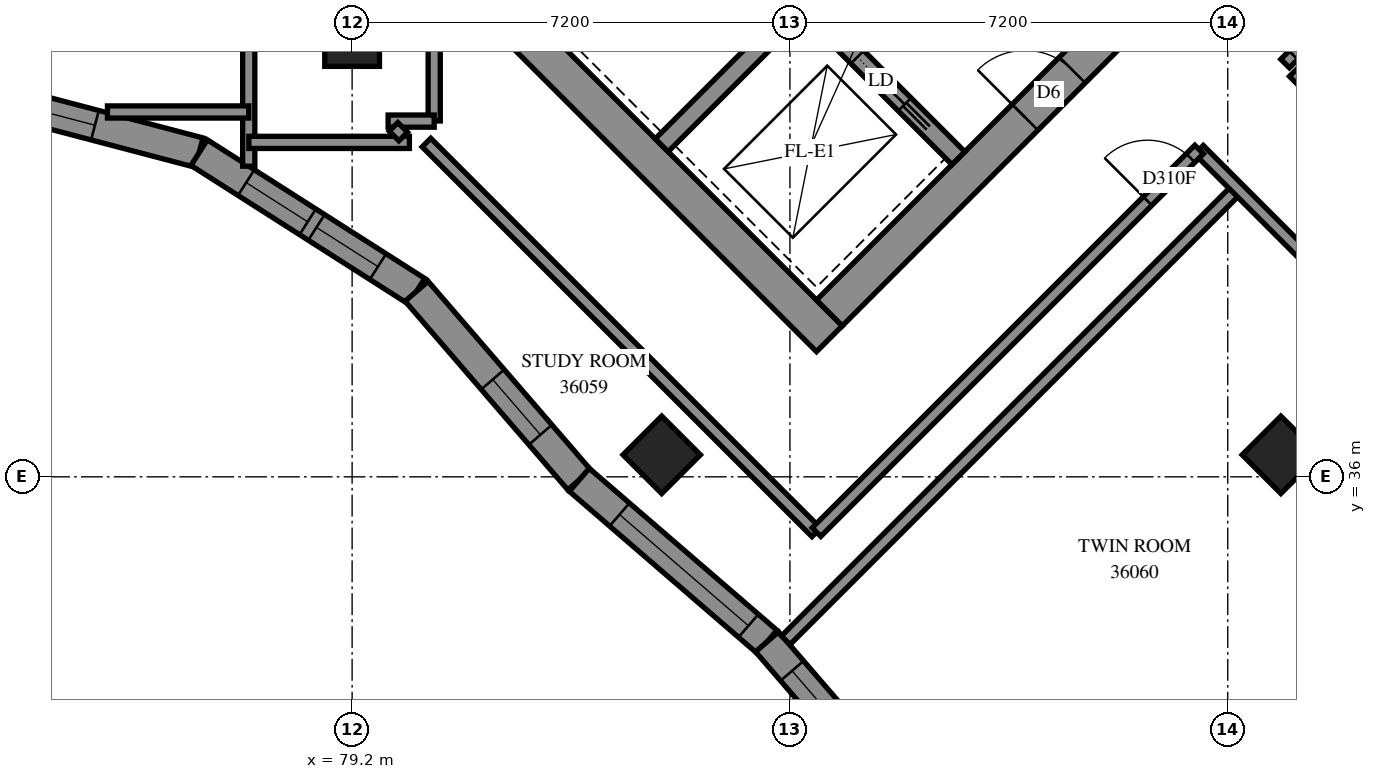
"""IFC4 building model, lengths in metres.
Left out: names, types, materials, properties, quantities, classifications, styles, units other than length and angle.
Written with IfcOpenShell. Run it as: python <this file> out.ifc"""

import sys

from ifc_helpers import new_model, si_unit, direction, frame, frame_2d, origin, origin_2d, place, context, subcontext, project, spatial, polyline, rectangle, outline, extrude, element, fill, save


model = new_model("IFC4")
c1 = context("Model", 3, precision=1e-05, world=origin(), true_north=direction((0.0, 1.0)))
c2 = subcontext(c1, "Body", "Model", "MODEL_VIEW")
j1 = project(units=[si_unit("LENGTHUNIT", "METRE"), si_unit("PLANEANGLEUNIT", "RADIAN")], contexts=[c1])
p1 = place(None, origin())
s1 = spatial("IfcSite", under=j1, at=p1, CompositionType="ELEMENT")
p2 = place(p1, origin())
s2 = spatial("IfcBuilding", under=s1, at=p2, CompositionType="ELEMENT")
p3 = place(p2, frame((0.0, 0.0, 135.4)))
s3 = spatial("IfcBuildingStorey", under=s2, at=p3, CompositionType="ELEMENT", Elevation=135.4)
for number, where, z_axis, x_axis in (
    (1, (79.2, 43.2, 0.0), (0.0, 0.0, 1.0), (1.0, 0.0, 0.0)),
    (2, (84.291, 36.362, 0.0), (0.0, 0.0, 1.0), (0.707, -0.707, 0.0)),
    (3, (94.474, 36.362, 0.0), (0.0, 0.0, 1.0), (0.707, -0.707, 0.0)),
):
    element("IfcColumn", number, at=place(p3, frame(where, z_axis=z_axis, x_axis=x_axis)), inside=s3, PredefinedType="COLUMN", context=c2, shape_type="SweptSolid", body=[
        extrude(rectangle(XDim=0.9, YDim=0.9, at=origin_2d()), origin(), (0.0, 0.0, 1.0), 3.1),
    ])
p4 = place(p3, frame((76.018, 49.302, -0.3), z_axis=(0.0, 0.0, 1.0), x_axis=(0.7071067812, -0.7071067812, 0.0)))
e4 = element("IfcWall", 4, at=p4, inside=s3, PredefinedType="SHEAR", context=c2, shape_type="SweptSolid", body=[
    extrude(rectangle(XDim=15.6, YDim=0.6, at=frame_2d((7.8, 0.0))), origin(), (0.0, 0.0, 1.0), 2.7),
])
p5 = place(p3, frame((87.049, 38.695, -0.3), z_axis=(0.0, 0.0, 1.0), x_axis=(0.7071067812, 0.7071067812, 0.0)))
e5 = element("IfcWall", 5, at=p5, inside=s3, PredefinedType="SHEAR", context=c2, shape_type="SweptSolid", body=[
    extrude(rectangle(XDim=14.4, YDim=0.6, at=frame_2d((7.2, 0.0))), origin(), (0.0, 0.0, 1.0), 2.7),
])
p6 = place(p5, frame((4.55, 0.0, 0.3)))
e6 = element("IfcOpeningElement", 6, at=p6, cuts=e5, PredefinedType="OPENING", context=c2, shape_type="SweptSolid", body=[
    extrude(rectangle(XDim=1.1, YDim=2.1, at=frame_2d((0.55, 1.05))), frame((0.0, 0.31, 0.0), z_axis=(0.0, -1.0, 0.0), x_axis=(1.0, 0.0, 0.0)), (0.0, 0.0, 1.0), 0.62),
])
p7 = place(p5, frame((11.35, 0.0, 0.3)))
e7 = element("IfcOpeningElement", 7, at=p7, cuts=e5, PredefinedType="OPENING", context=c2, shape_type="SweptSolid", body=[
    extrude(rectangle(XDim=1.1, YDim=2.1, at=frame_2d((0.55, 1.05))), frame((0.0, 0.31, 0.0), z_axis=(0.0, -1.0, 0.0), x_axis=(1.0, 0.0, 0.0)), (0.0, 0.0, 1.0), 0.62),
])
p8 = place(p3, frame((84.291, 41.453, 0.0), z_axis=(0.0, 0.0, 1.0), x_axis=(0.7071067812, 0.7071067812, 0.0)))
e8 = element("IfcWall", 8, at=p8, inside=s3, PredefinedType="SOLIDWALL", context=c2, shape_type="SweptSolid", body=[
    extrude(rectangle(XDim=3.3, YDim=0.3, at=frame_2d((1.65, 0.0))), origin(), (0.0, 0.0, 1.0), 3.1),
])
p9 = place(p3, frame((78.988, 51.423, 0.0), z_axis=(0.0, 0.0, 1.0), x_axis=(0.7071067812, -0.7071067812, 0.0)))
e9 = element("IfcWall", 9, at=p9, inside=s3, PredefinedType="SOLIDWALL", context=c2, shape_type="SweptSolid", body=[
    extrude(rectangle(XDim=14.4, YDim=0.3, at=frame_2d((7.2, 0.0))), origin(), (0.0, 0.0, 1.0), 3.1),
])
p10 = place(p9, frame((12.05, 0.0, 0.0)))
e10 = element("IfcOpeningElement", 10, at=p10, cuts=e9, PredefinedType="OPENING", context=c2, shape_type="SweptSolid", body=[
    extrude(rectangle(XDim=1.1, YDim=2.1, at=frame_2d((0.55, 1.05))), frame((0.0, 0.16, 0.0), z_axis=(0.0, -1.0, 0.0), x_axis=(1.0, 0.0, 0.0)), (0.0, 0.0, 1.0), 0.32),
])
p11 = place(p3, frame((73.182, 42.253, 0.0), z_axis=(0.0, 0.0, 1.0), x_axis=(0.9671281624, -0.2542894363, 0.0)))
e11 = element("IfcWall", 11, at=p11, inside=s3, PredefinedType="SOLIDWALL", context=c2, shape_type="SweptSolid", body=[
    extrude(outline(polyline([(0.043, -0.25), (3.583, -0.25), (3.661, 0.25), (-0.043, 0.25), (0.043, -0.25)])), origin(), (0.0, 0.0, 1.0), 3.1),
])
p12 = place(p11, frame((0.65, 0.0, 0.45)))
e12 = element("IfcOpeningElement", 12, at=p12, cuts=e11, PredefinedType="OPENING", context=c2, shape_type="SweptSolid", body=[
    extrude(rectangle(XDim=1.2, YDim=2.5, at=frame_2d((0.6, 1.25))), frame((0.0, 0.26, 0.0), z_axis=(0.0, -1.0, 0.0), x_axis=(1.0, 0.0, 0.0)), (0.0, 0.0, 1.0), 0.52),
])
p13 = place(p3, frame((76.684, 41.332, 0.0), z_axis=(0.0, 0.0, 1.0), x_axis=(0.8431951323, -0.5376076347, 0.0)))
e13 = element("IfcWall", 13, at=p13, inside=s3, PredefinedType="SOLIDWALL", context=c2, shape_type="SweptSolid", body=[
    extrude(outline(polyline([(0.039, -0.25), (4.204, -0.25), (4.278, 0.25), (-0.039, 0.25), (0.039, -0.25)])), origin(), (0.0, 0.0, 1.0), 3.1),
])
p14 = place(p13, frame((0.917, 0.0, 0.45)))
e14 = element("IfcOpeningElement", 14, at=p14, cuts=e13, PredefinedType="OPENING", context=c2, shape_type="SweptSolid", body=[
    extrude(rectangle(XDim=1.2, YDim=2.5, at=frame_2d((0.6, 1.25))), frame((0.0, 0.26, 0.0), z_axis=(0.0, -1.0, 0.0), x_axis=(1.0, 0.0, 0.0)), (0.0, 0.0, 1.0), 0.52),
])
p15 = place(p13, frame((2.288, 0.0, 0.45)))
e15 = element("IfcOpeningElement", 15, at=p15, cuts=e13, PredefinedType="OPENING", context=c2, shape_type="SweptSolid", body=[
    extrude(rectangle(XDim=1.2, YDim=2.5, at=frame_2d((0.6, 1.25))), frame((0.0, 0.26, 0.0), z_axis=(0.0, -1.0, 0.0), x_axis=(1.0, 0.0, 0.0)), (0.0, 0.0, 1.0), 0.52),
])
p16 = place(p3, frame((80.26, 39.052, 0.0), z_axis=(0.0, 0.0, 1.0), x_axis=(0.6531786437, -0.7572038427, 0.0)))
e16 = element("IfcWall", 16, at=p16, inside=s3, PredefinedType="SOLIDWALL", context=c2, shape_type="SweptSolid", body=[
    extrude(outline(polyline([(0.037, -0.25), (4.114, -0.25), (4.078, 0.25), (-0.037, 0.25), (0.037, -0.25)])), origin(), (0.0, 0.0, 1.0), 3.1),
])
p17 = place(p16, frame((1.917, 0.0, 0.45)))
e17 = element("IfcOpeningElement", 17, at=p17, cuts=e16, PredefinedType="OPENING", context=c2, shape_type="SweptSolid", body=[
    extrude(rectangle(XDim=1.2, YDim=2.5, at=frame_2d((0.6, 1.25))), frame((0.0, 0.26, 0.0), z_axis=(0.0, -1.0, 0.0), x_axis=(1.0, 0.0, 0.0)), (0.0, 0.0, 1.0), 0.52),
])
p18 = place(p3, frame((82.936, 35.95, 0.0), z_axis=(0.0, 0.0, 1.0), x_axis=(0.7572154684, -0.6531651662, 0.0)))
e18 = element("IfcWall", 18, at=p18, inside=s3, PredefinedType="SOLIDWALL", context=c2, shape_type="SweptSolid", body=[
    extrude(outline(polyline([(-0.018, -0.25), (4.059, -0.25), (4.096, 0.25), (0.018, 0.25), (-0.018, -0.25)])), origin(), (0.0, 0.0, 1.0), 3.1),
])
p19 = place(p18, frame((0.873, 0.0, 0.45)))
e19 = element("IfcOpeningElement", 19, at=p19, cuts=e18, PredefinedType="OPENING", context=c2, shape_type="SweptSolid", body=[
    extrude(rectangle(XDim=2.8, YDim=2.5, at=frame_2d((1.4, 1.25))), frame((0.0, 0.26, 0.0), z_axis=(0.0, -1.0, 0.0), x_axis=(1.0, 0.0, 0.0)), (0.0, 0.0, 1.0), 0.52),
])
p20 = place(p3, frame((86.024, 33.287, 0.0), z_axis=(0.0, 0.0, 1.0), x_axis=(0.6531651662, -0.7572154684, 0.0)))
e20 = element("IfcWall", 20, at=p20, inside=s3, PredefinedType="SOLIDWALL", context=c2, shape_type="SweptSolid", body=[
    extrude(outline(polyline([(0.018, -0.25), (4.096, -0.25), (4.059, 0.25), (-0.018, 0.25), (0.018, -0.25)])), origin(), (0.0, 0.0, 1.0), 3.1),
])
p21 = place(p20, frame((0.63, 0.0, 0.45)))
e21 = element("IfcOpeningElement", 21, at=p21, cuts=e20, PredefinedType="OPENING", context=c2, shape_type="SweptSolid", body=[
    extrude(rectangle(XDim=2.8, YDim=2.5, at=frame_2d((1.4, 1.25))), frame((0.0, 0.26, 0.0), z_axis=(0.0, -1.0, 0.0), x_axis=(1.0, 0.0, 0.0)), (0.0, 0.0, 1.0), 0.52),
])
p22 = place(p3, frame((86.332, 33.313, 0.0), z_axis=(0.0, 0.0, 1.0), x_axis=(0.7071020252, 0.7071115371, 0.0)))
e22 = element("IfcWall", 22, at=p22, inside=s3, PredefinedType="PARTITIONING", context=c2, shape_type="SweptSolid", body=[
    extrude(rectangle(XDim=10.513, YDim=0.2, at=frame_2d((5.257, 0.0))), origin(), (0.0, 0.0, 1.0), 3.1),
])
p23 = place(p3, frame((93.127, 41.379, 0.0), z_axis=(0.0, 0.0, 1.0), x_axis=(0.7071067812, -0.7071067812, 0.0)))
e23 = element("IfcWall", 23, at=p23, inside=s3, PredefinedType="PARTITIONING", context=c2, shape_type="SweptSolid", body=[
    extrude(rectangle(XDim=9.39, YDim=0.2, at=frame_2d((4.695, 0.0))), origin(), (0.0, 0.0, 1.0), 3.1),
])
p24 = place(p23, frame((3.2, 0.0, 0.0)))
e24 = element("IfcOpeningElement", 24, at=p24, cuts=e23, PredefinedType="OPENING", context=c2, shape_type="SweptSolid", body=[
    extrude(rectangle(XDim=0.9, YDim=2.1, at=frame_2d((0.45, 1.05))), frame((0.0, 0.11, 0.0), z_axis=(0.0, -1.0, 0.0), x_axis=(1.0, 0.0, 0.0)), (0.0, 0.0, 1.0), 0.22),
])
p25 = place(p3, frame((80.423, 41.497, 0.0), z_axis=(0.0, 0.0, 1.0), x_axis=(0.7071067812, -0.7071067812, 0.0)))
e25 = element("IfcWall", 25, at=p25, inside=s3, PredefinedType="PARTITIONING", context=c2, shape_type="SweptSolid", body=[
    extrude(rectangle(XDim=9.065, YDim=0.2, at=frame_2d((4.532, 0.0))), origin(), (0.0, 0.0, 1.0), 3.1),
])
p26 = place(p3, frame((94.543, 42.797, 0.0), z_axis=(0.0, 0.0, 1.0), x_axis=(0.7071067812, 0.7071067812, 0.0)))
e26 = element("IfcWall", 26, at=p26, inside=s3, PredefinedType="PARTITIONING", context=c2, shape_type="SweptSolid", body=[
    extrude(rectangle(XDim=8.901, YDim=0.2, at=frame_2d((4.45, 0.0))), origin(), (0.0, 0.0, 1.0), 3.1),
])
p27 = place(p26, frame((0.193, 0.0, 0.0)))
e27 = element("IfcOpeningElement", 27, at=p27, cuts=e26, PredefinedType="OPENING", context=c2, shape_type="SweptSolid", body=[
    extrude(rectangle(XDim=1.0, YDim=2.1, at=frame_2d((0.5, 1.05))), frame((0.0, 0.11, 0.0), z_axis=(0.0, -1.0, 0.0), x_axis=(1.0, 0.0, 0.0)), (0.0, 0.0, 1.0), 0.22),
])
p28 = place(p3, frame((86.837, 35.091, 0.0), z_axis=(0.0, 0.0, 1.0), x_axis=(0.7071067812, 0.7071067812, 0.0)))
e28 = element("IfcWall", 28, at=p28, inside=s3, PredefinedType="PARTITIONING", context=c2, shape_type="SweptSolid", body=[
    extrude(rectangle(XDim=8.898, YDim=0.2, at=frame_2d((4.449, 0.0))), origin(), (0.0, 0.0, 1.0), 3.1),
])
p29 = place(p28, frame((7.7, 0.0, 0.0)))
e29 = element("IfcOpeningElement", 29, at=p29, cuts=e28, PredefinedType="OPENING", context=c2, shape_type="SweptSolid", body=[
    extrude(rectangle(XDim=1.0, YDim=2.1, at=frame_2d((0.5, 1.05))), frame((0.0, 0.11, 0.0), z_axis=(0.0, -1.0, 0.0), x_axis=(1.0, 0.0, 0.0)), (0.0, 0.0, 1.0), 0.22),
])
p30 = place(p3, frame((91.398, 28.19, 0.0), z_axis=(0.0, 0.0, 1.0), x_axis=(0.7072294342, 0.7069841069, 0.0)))
e30 = element("IfcWall", 30, at=p30, inside=s3, PredefinedType="PARTITIONING", context=c2, shape_type="SweptSolid", body=[
    extrude(rectangle(XDim=8.152, YDim=0.2, at=frame_2d((4.076, 0.0))), origin(), (0.0, 0.0, 1.0), 3.1),
])
p31 = place(p3, frame((77.5, 41.108, 0.0), z_axis=(0.0, 0.0, 1.0), x_axis=(0.0, 1.0, 0.0)))
e31 = element("IfcWall", 31, at=p31, inside=s3, PredefinedType="PARTITIONING", context=c2, shape_type="SweptSolid", body=[
    extrude(rectangle(XDim=3.034, YDim=0.2, at=frame_2d((1.517, 0.0))), origin(), (0.0, 0.0, 1.0), 3.1),
])
p32 = place(p3, frame((77.502, 41.5, 0.0), z_axis=(0.0, 0.0, 1.0), x_axis=(1.0, 0.0, 0.0)))
e32 = element("IfcWall", 32, at=p32, inside=s3, PredefinedType="PARTITIONING", context=c2, shape_type="SweptSolid", body=[
    extrude(rectangle(XDim=2.64, YDim=0.2, at=frame_2d((1.32, 0.0))), origin(), (0.0, 0.0, 1.0), 3.1),
])
p33 = place(p3, frame((80.55, 41.852, 0.0), z_axis=(0.0, 0.0, 1.0), x_axis=(0.0, 1.0, 0.0)))
e33 = element("IfcWall", 33, at=p33, inside=s3, PredefinedType="PARTITIONING", context=c2, shape_type="SweptSolid", body=[
    extrude(rectangle(XDim=2.38, YDim=0.2, at=frame_2d((1.19, 0.0))), origin(), (0.0, 0.0, 1.0), 3.1),
])
p34 = place(p3, frame((75.177, 42.0, 0.0), z_axis=(0.0, 0.0, 1.0), x_axis=(1.0, 0.0, 0.0)))
e34 = element("IfcWall", 34, at=p34, inside=s3, PredefinedType="PARTITIONING", context=c2, shape_type="SweptSolid", body=[
    extrude(rectangle(XDim=2.324, YDim=0.2, at=frame_2d((1.162, 0.0))), origin(), (0.0, 0.0, 1.0), 3.1),
])
p35 = place(p3, frame((79.792, 41.85, 0.0), z_axis=(0.0, 0.0, 1.0), x_axis=(1.0, 0.0, 0.0)))
e35 = element("IfcWall", 35, at=p35, inside=s3, PredefinedType="PARTITIONING", context=c2, shape_type="SweptSolid", body=[
    extrude(rectangle(XDim=0.758, YDim=0.2, at=frame_2d((0.379, 0.0))), origin(), (0.0, 0.0, 1.0), 3.1),
])
p36 = place(p3, frame((94.686, 42.656, 0.0), z_axis=(0.0, 0.0, 1.0), x_axis=(0.7056768426, -0.7085338339, 0.0)))
e36 = element("IfcWall", 36, at=p36, inside=s3, PredefinedType="PARTITIONING", context=c2, shape_type="SweptSolid", body=[
    extrude(rectangle(XDim=0.7, YDim=0.2, at=frame_2d((0.35, 0.0))), origin(), (0.0, 0.0, 1.0), 3.1),
])
p37 = place(p3, frame((79.881, 41.755, 0.0), z_axis=(0.0, 0.0, 1.0), x_axis=(0.7071067812, -0.7071067812, 0.0)))
e37 = element("IfcWall", 37, at=p37, inside=s3, PredefinedType="PARTITIONING", context=c2, shape_type="SweptSolid", body=[
    extrude(rectangle(XDim=0.225, YDim=0.2, at=frame_2d((0.113, 0.0))), origin(), (0.0, 0.0, 1.0), 3.1),
])
p38 = place(p12, origin())
e38 = element("IfcWindow", 38, at=p38, inside=s3, PartitioningType="SINGLE_PANEL", PredefinedType="WINDOW", context=c2, shape_type="SweptSolid", body=[
    extrude(rectangle(XDim=1.2, YDim=2.5, at=frame_2d((0.6, 1.25))), frame((0.0, 0.18, 0.0), z_axis=(0.0, -1.0, 0.0), x_axis=(1.0, 0.0, 0.0)), (0.0, 0.0, 1.0), 0.06),
])
fill(e12, e38)
p39 = place(p14, origin())
e39 = element("IfcWindow", 39, at=p39, inside=s3, PartitioningType="SINGLE_PANEL", PredefinedType="WINDOW", context=c2, shape_type="SweptSolid", body=[
    extrude(rectangle(XDim=1.2, YDim=2.5, at=frame_2d((0.6, 1.25))), frame((0.0, 0.18, 0.0), z_axis=(0.0, -1.0, 0.0), x_axis=(1.0, 0.0, 0.0)), (0.0, 0.0, 1.0), 0.06),
])
fill(e14, e39)
p40 = place(p15, origin())
e40 = element("IfcWindow", 40, at=p40, inside=s3, PartitioningType="SINGLE_PANEL", PredefinedType="WINDOW", context=c2, shape_type="SweptSolid", body=[
    extrude(rectangle(XDim=1.2, YDim=2.5, at=frame_2d((0.6, 1.25))), frame((0.0, 0.18, 0.0), z_axis=(0.0, -1.0, 0.0), x_axis=(1.0, 0.0, 0.0)), (0.0, 0.0, 1.0), 0.06),
])
fill(e15, e40)
p41 = place(p17, origin())
e41 = element("IfcWindow", 41, at=p41, inside=s3, PartitioningType="SINGLE_PANEL", PredefinedType="WINDOW", context=c2, shape_type="SweptSolid", body=[
    extrude(rectangle(XDim=1.2, YDim=2.5, at=frame_2d((0.6, 1.25))), frame((0.0, 0.18, 0.0), z_axis=(0.0, -1.0, 0.0), x_axis=(1.0, 0.0, 0.0)), (0.0, 0.0, 1.0), 0.06),
])
fill(e17, e41)
p42 = place(p19, origin())
e42 = element("IfcWindow", 42, at=p42, inside=s3, PartitioningType="SINGLE_PANEL", PredefinedType="WINDOW", context=c2, shape_type="SweptSolid", body=[
    extrude(rectangle(XDim=2.8, YDim=2.5, at=frame_2d((1.4, 1.25))), frame((0.0, 0.18, 0.0), z_axis=(0.0, -1.0, 0.0), x_axis=(1.0, 0.0, 0.0)), (0.0, 0.0, 1.0), 0.06),
])
fill(e19, e42)
p43 = place(p21, origin())
e43 = element("IfcWindow", 43, at=p43, inside=s3, PartitioningType="SINGLE_PANEL", PredefinedType="WINDOW", context=c2, shape_type="SweptSolid", body=[
    extrude(rectangle(XDim=2.8, YDim=2.5, at=frame_2d((1.4, 1.25))), frame((0.0, 0.18, 0.0), z_axis=(0.0, -1.0, 0.0), x_axis=(1.0, 0.0, 0.0)), (0.0, 0.0, 1.0), 0.06),
])
fill(e21, e43)
p44 = place(p6, origin())
e44 = element("IfcDoor", 44, at=p44, inside=s3, OperationType="DOUBLE_DOOR_SINGLE_SWING", PredefinedType="DOOR", context=c2, shape_type="SweptSolid", body=[
    extrude(rectangle(XDim=1.1, YDim=2.1, at=frame_2d((0.55, 1.05))), frame((0.0, 0.025, 0.0), z_axis=(0.0, -1.0, 0.0), x_axis=(1.0, 0.0, 0.0)), (0.0, 0.0, 1.0), 0.05),
])
fill(e6, e44)
p45 = place(p10, origin())
e45 = element("IfcDoor", 45, at=p45, inside=s3, OperationType="SLIDING_TO_RIGHT", PredefinedType="DOOR", context=c2, shape_type="SweptSolid", body=[
    extrude(rectangle(XDim=1.1, YDim=2.1, at=frame_2d((0.55, 1.05))), frame((0.0, 0.025, 0.0), z_axis=(0.0, -1.0, 0.0), x_axis=(1.0, 0.0, 0.0)), (0.0, 0.0, 1.0), 0.05),
])
fill(e10, e45)
p46 = place(p27, origin())
e46 = element("IfcDoor", 46, at=p46, inside=s3, OperationType="SINGLE_SWING_LEFT", PredefinedType="DOOR", context=c2, shape_type="SweptSolid", body=[
    extrude(rectangle(XDim=1.0, YDim=2.1, at=frame_2d((0.5, 1.05))), frame((0.0, 0.025, 0.0), z_axis=(0.0, -1.0, 0.0), x_axis=(1.0, 0.0, 0.0)), (0.0, 0.0, 1.0), 0.05),
])
fill(e27, e46)
p47 = place(p29, origin())
e47 = element("IfcDoor", 47, at=p47, inside=s3, OperationType="SINGLE_SWING_LEFT", PredefinedType="DOOR", context=c2, shape_type="SweptSolid", body=[
    extrude(rectangle(XDim=1.0, YDim=2.1, at=frame_2d((0.5, 1.05))), frame((0.0, 0.025, 0.0), z_axis=(0.0, -1.0, 0.0), x_axis=(1.0, 0.0, 0.0)), (0.0, 0.0, 1.0), 0.05),
])
fill(e29, e47)
save(model, sys.argv[1])
